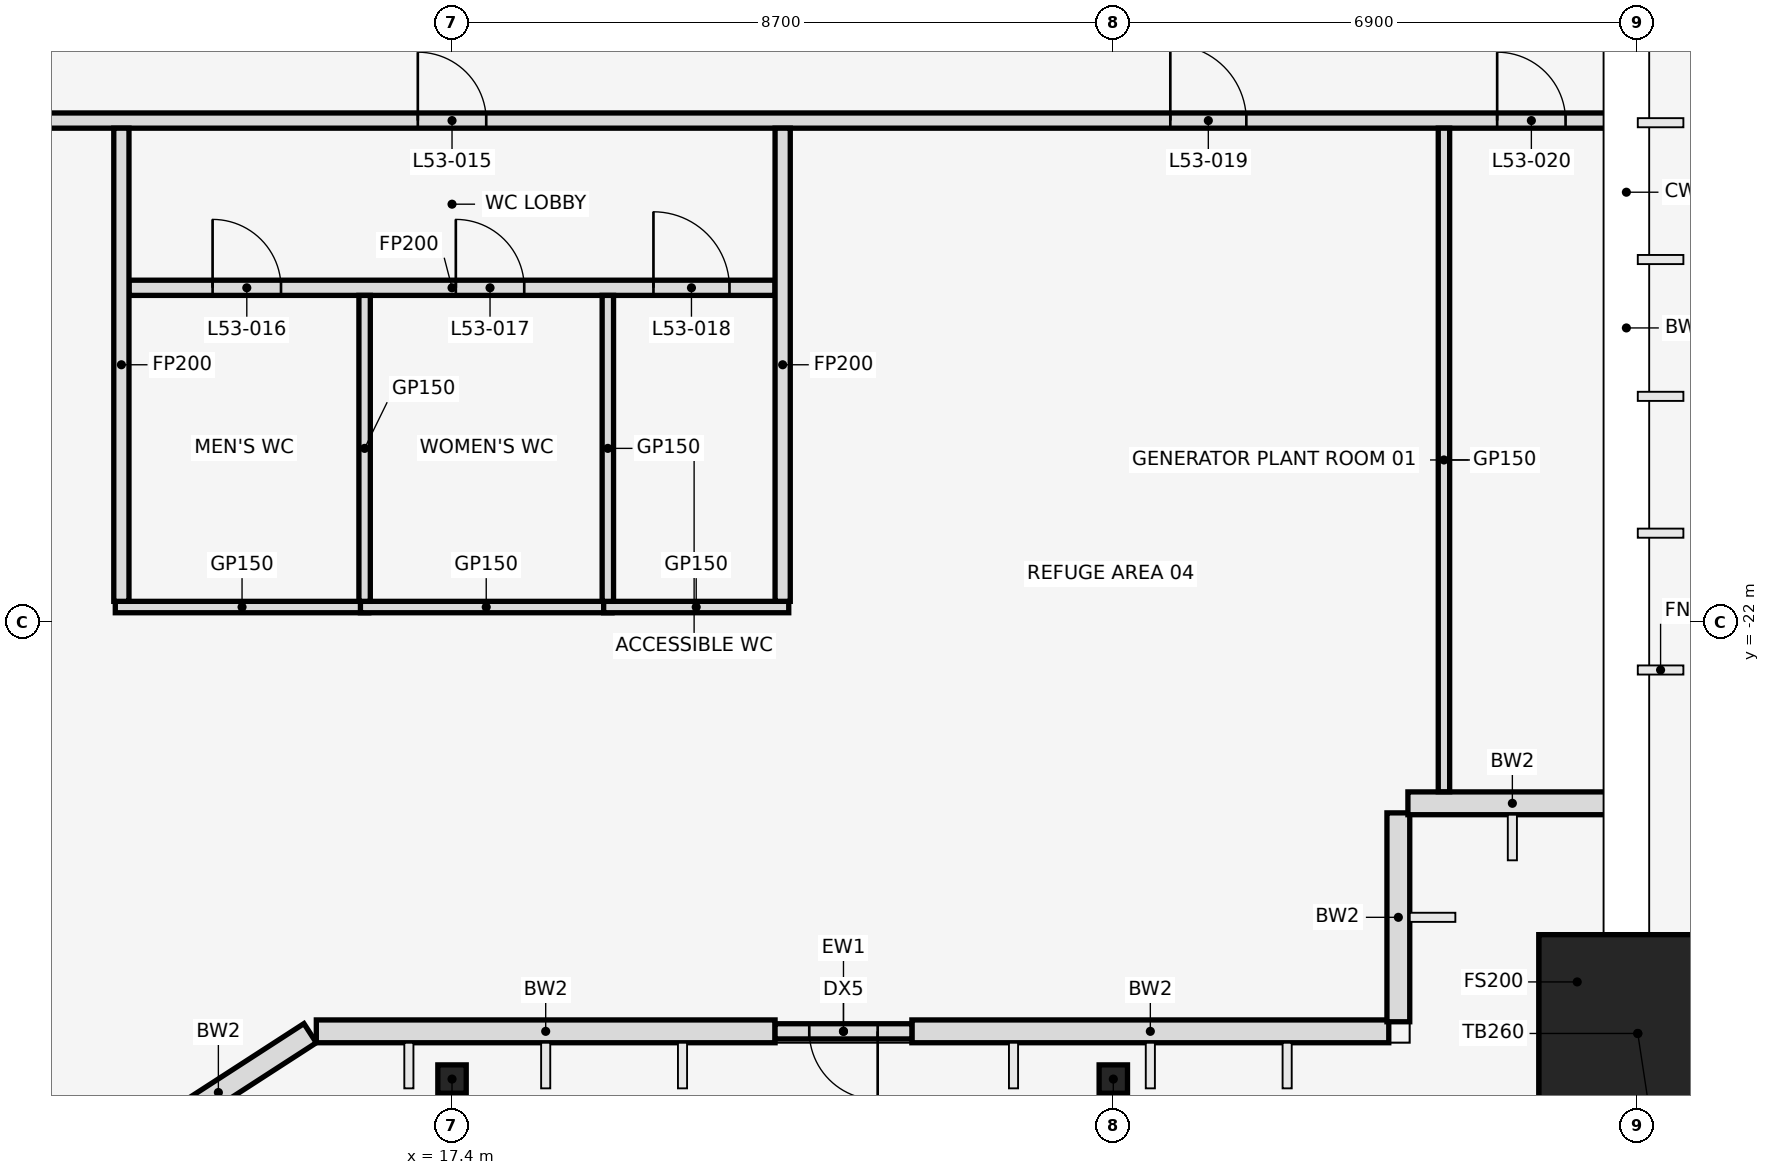
"""IFC4 building model, lengths in metres.
Left out: names, types, materials, properties, quantities, classifications, styles, units other than length and angle.
Written with IfcOpenShell. Run it as: python <this file> out.ifc"""

import sys

from ifc_helpers import new_model, si_unit, direction, frame, frame_2d, origin, origin_2d, place, context, subcontext, project, spatial, rectangle, hollow_rectangle, i_section, extrude, element, fill, save


model = new_model("IFC4")
c1 = context("Model", 3, precision=1e-05, world=origin(), true_north=direction((0.0, 1.0)))
c2 = subcontext(c1, "Body", "Model", "MODEL_VIEW")
j1 = project(units=[si_unit("LENGTHUNIT", "METRE"), si_unit("PLANEANGLEUNIT", "RADIAN")], contexts=[c1])
p1 = place(None, origin())
s1 = spatial("IfcSite", under=j1, at=p1, CompositionType="ELEMENT")
p2 = place(p1, origin())
s2 = spatial("IfcBuilding", under=s1, at=p2, CompositionType="ELEMENT")
p3 = place(p2, frame((0.0, 0.0, 236.0)))
s3 = spatial("IfcBuildingStorey", under=s2, at=p3, CompositionType="ELEMENT", Elevation=236.0)
for number, where, z_axis, x_axis in (
    (1, (17.4, -28.01, 0.0), (0.0, 0.0, 1.0), (1.0, 0.0, 0.0)),
    (2, (26.1, -28.01, 0.0), (0.0, 0.0, 1.0), (1.0, 0.0, 0.0)),
):
    element("IfcColumn", number, at=place(p3, frame(where, z_axis=z_axis, x_axis=x_axis)), inside=s3, PredefinedType="COLUMN", context=c2, shape_type="SweptSolid", body=[
        extrude(i_section(OverallWidth=0.373, OverallDepth=0.373, WebThickness=0.016, FlangeThickness=0.026, at=origin_2d()), origin(), (0.0, 0.0, 1.0), 5.4),
    ])
p4 = place(p3, frame((33.0, -27.41, 0.0), z_axis=(0.0, 0.0, 1.0), x_axis=(1.0, 0.0, 0.0)))
e3 = element("IfcColumn", 3, at=p4, inside=s3, PredefinedType="COLUMN", context=c2, shape_type="SweptSolid", body=[
    extrude(hollow_rectangle(XDim=2.6, YDim=2.6, WallThickness=0.07, at=origin_2d()), origin(), (0.0, 0.0, 1.0), 4.98),
])
p5 = place(p3, frame((33.0, -27.41, 4.98), z_axis=(0.0, 0.0, 1.0), x_axis=(1.0, 0.0, 0.0)))
e4 = element("IfcColumn", 4, at=p5, inside=s3, PredefinedType="COLUMN", context=c2, shape_type="SweptSolid", body=[
    extrude(rectangle(XDim=2.6, YDim=2.6, at=origin_2d()), origin(), (0.0, 0.0, 1.0), 0.42),
])
p6 = place(p3, frame((32.85, -24.256, 0.0), z_axis=(0.0, 0.0, 1.0), x_axis=(0.0, 1.0, 0.0)))
e5 = element("IfcWall", 5, at=p6, inside=s3, PredefinedType="STANDARD", context=c2, shape_type="SweptSolid", body=[
    extrude(rectangle(XDim=12.256, YDim=0.3, at=frame_2d((6.128, 0.0))), origin(), (0.0, 0.0, 1.0), 4.338),
])
p7 = place(p3, frame((13.119, -28.967, 0.0), z_axis=(0.0, 0.0, 1.0), x_axis=(0.839779682339, 0.542927329512, 0.0)))
e6 = element("IfcWall", 6, at=p7, inside=s3, PredefinedType="STANDARD", context=c2, shape_type="SweptSolid", body=[
    extrude(rectangle(XDim=2.875, YDim=0.3, at=frame_2d((1.438, 0.0))), origin(), (0.0, 0.0, 1.0), 4.496),
])
p8 = place(p3, frame((15.615, -27.382, 0.0), z_axis=(0.0, 0.0, 1.0), x_axis=(1.0, 0.0, 0.0)))
e7 = element("IfcWall", 7, at=p8, inside=s3, PredefinedType="STANDARD", context=c2, shape_type="SweptSolid", body=[
    extrude(rectangle(XDim=6.035, YDim=0.3, at=frame_2d((3.018, 0.0))), origin(), (0.0, 0.0, 1.0), 4.572),
])
p9 = place(p3, frame((23.45, -27.382, 0.0), z_axis=(0.0, 0.0, 1.0), x_axis=(1.0, 0.0, 0.0)))
e8 = element("IfcWall", 8, at=p9, inside=s3, PredefinedType="STANDARD", context=c2, shape_type="SweptSolid", body=[
    extrude(rectangle(XDim=6.274, YDim=0.3, at=frame_2d((3.137, 0.0))), origin(), (0.0, 0.0, 1.0), 4.572),
])
for number, where, z_axis, x_axis in (
    (9, (29.85, -27.256, 0.0), (0.0, 0.0, 1.0), (0.0, 1.0, 0.0)),
    (10, (29.976, -24.382, 0.0), (0.0, 0.0, 1.0), (1.0, 0.0, 0.0)),
):
    element("IfcWall", number, at=place(p3, frame(where, z_axis=z_axis, x_axis=x_axis)), inside=s3, PredefinedType="STANDARD", context=c2, shape_type="SweptSolid", body=[
        extrude(rectangle(XDim=2.748, YDim=0.3, at=frame_2d((1.374, 0.0))), origin(), (0.0, 0.0, 1.0), 4.572),
    ])
p10 = place(p3, frame((23.45, -27.382, 0.0), z_axis=(0.0, 0.0, 1.0), x_axis=(-1.0, 0.0, 0.0)))
e11 = element("IfcWall", 11, at=p10, inside=s3, PredefinedType="STANDARD", context=c2, shape_type="SweptSolid", body=[
    extrude(rectangle(XDim=1.8, YDim=0.2, at=frame_2d((0.9, 0.0))), origin(), (0.0, 0.0, 1.0), 5.25),
])
p11 = place(p10, frame((0.45, 0.0, 0.0)))
e12 = element("IfcOpeningElement", 12, at=p11, cuts=e11, PredefinedType="OPENING", context=c2, shape_type="SweptSolid", body=[
    extrude(rectangle(XDim=0.9, YDim=2.1, at=frame_2d((0.45, 1.05))), frame((0.0, 0.112, 0.0), z_axis=(0.0, -1.0, 0.0), x_axis=(1.0, 0.0, 0.0)), (0.0, 0.0, 1.0), 0.224),
])
p12 = place(p3, frame((12.97, -21.8, 0.0), z_axis=(0.0, 0.0, 1.0), x_axis=(1.0, 0.0, 0.0)))
e13 = element("IfcWall", 13, at=p12, inside=s3, PredefinedType="PARTITIONING", context=c2, shape_type="SweptSolid", body=[
    extrude(rectangle(XDim=3.335, YDim=0.15, at=frame_2d((1.667, 0.0))), origin(), (0.0, 0.0, 1.0), 4.318),
])
p13 = place(p3, frame((16.195, -21.8, 0.0), z_axis=(0.0, 0.0, 1.0), x_axis=(1.0, 0.0, 0.0)))
e14 = element("IfcWall", 14, at=p13, inside=s3, PredefinedType="PARTITIONING", context=c2, shape_type="SweptSolid", body=[
    extrude(rectangle(XDim=3.31, YDim=0.15, at=frame_2d((1.655, 0.0))), origin(), (0.0, 0.0, 1.0), 4.318),
])
p14 = place(p3, frame((19.395, -21.8, 0.0), z_axis=(0.0, 0.0, 1.0), x_axis=(1.0, 0.0, 0.0)))
e15 = element("IfcWall", 15, at=p14, inside=s3, PredefinedType="PARTITIONING", context=c2, shape_type="SweptSolid", body=[
    extrude(rectangle(XDim=2.435, YDim=0.15, at=frame_2d((1.218, 0.0))), origin(), (0.0, 0.0, 1.0), 4.318),
])
p15 = place(p3, frame((13.15, -17.6, 0.0), z_axis=(0.0, 0.0, 1.0), x_axis=(1.0, 0.0, 0.0)))
e16 = element("IfcWall", 16, at=p15, inside=s3, PredefinedType="PARTITIONING", context=c2, shape_type="SweptSolid", body=[
    extrude(rectangle(XDim=8.5, YDim=0.2, at=frame_2d((4.25, 0.0))), origin(), (0.0, 0.0, 1.0), 4.318),
])
p16 = place(p15, frame((1.1, 0.0, 0.0)))
e17 = element("IfcOpeningElement", 17, at=p16, cuts=e16, PredefinedType="OPENING", context=c2, shape_type="SweptSolid", body=[
    extrude(rectangle(XDim=0.9, YDim=2.1, at=frame_2d((0.45, 1.05))), frame((0.0, 0.112, 0.0), z_axis=(0.0, -1.0, 0.0), x_axis=(1.0, 0.0, 0.0)), (0.0, 0.0, 1.0), 0.224),
])
p17 = place(p15, frame((4.3, 0.0, 0.0)))
e18 = element("IfcOpeningElement", 18, at=p17, cuts=e16, PredefinedType="OPENING", context=c2, shape_type="SweptSolid", body=[
    extrude(rectangle(XDim=0.9, YDim=2.1, at=frame_2d((0.45, 1.05))), frame((0.0, 0.112, 0.0), z_axis=(0.0, -1.0, 0.0), x_axis=(1.0, 0.0, 0.0)), (0.0, 0.0, 1.0), 0.224),
])
p18 = place(p15, frame((6.9, 0.0, 0.0)))
e19 = element("IfcOpeningElement", 19, at=p18, cuts=e16, PredefinedType="OPENING", context=c2, shape_type="SweptSolid", body=[
    extrude(rectangle(XDim=1.0, YDim=2.1, at=frame_2d((0.5, 1.05))), frame((0.0, 0.112, 0.0), z_axis=(0.0, -1.0, 0.0), x_axis=(1.0, 0.0, 0.0)), (0.0, 0.0, 1.0), 0.224),
])
p19 = place(p3, frame((-32.7, -15.4, 0.0), z_axis=(0.0, 0.0, 1.0), x_axis=(1.0, 0.0, 0.0)))
e20 = element("IfcWall", 20, at=p19, inside=s3, PredefinedType="PARTITIONING", context=c2, shape_type="SweptSolid", body=[
    extrude(rectangle(XDim=65.4, YDim=0.2, at=frame_2d((32.7, 0.0))), origin(), (0.0, 0.0, 1.0), 4.318),
])
p20 = place(p19, frame((0.7, 0.0, 0.0)))
e21 = element("IfcOpeningElement", 21, at=p20, cuts=e20, PredefinedType="OPENING", context=c2, shape_type="SweptSolid", body=[
    extrude(rectangle(XDim=0.9, YDim=2.1, at=frame_2d((0.45, 1.05))), frame((0.0, 0.112, 0.0), z_axis=(0.0, -1.0, 0.0), x_axis=(1.0, 0.0, 0.0)), (0.0, 0.0, 1.0), 0.224),
])
p21 = place(p19, frame((4.85, 0.0, 0.0)))
e22 = element("IfcOpeningElement", 22, at=p21, cuts=e20, PredefinedType="OPENING", context=c2, shape_type="SweptSolid", body=[
    extrude(rectangle(XDim=1.0, YDim=2.1, at=frame_2d((0.5, 1.05))), frame((0.0, 0.112, 0.0), z_axis=(0.0, -1.0, 0.0), x_axis=(1.0, 0.0, 0.0)), (0.0, 0.0, 1.0), 0.224),
])
p22 = place(p19, frame((14.85, 0.0, 0.0)))
e23 = element("IfcOpeningElement", 23, at=p22, cuts=e20, PredefinedType="OPENING", context=c2, shape_type="SweptSolid", body=[
    extrude(rectangle(XDim=1.0, YDim=2.1, at=frame_2d((0.5, 1.05))), frame((0.0, 0.112, 0.0), z_axis=(0.0, -1.0, 0.0), x_axis=(1.0, 0.0, 0.0)), (0.0, 0.0, 1.0), 0.224),
])
p23 = place(p19, frame((23.55, 0.0, 0.0)))
e24 = element("IfcOpeningElement", 24, at=p23, cuts=e20, PredefinedType="OPENING", context=c2, shape_type="SweptSolid", body=[
    extrude(rectangle(XDim=1.0, YDim=2.1, at=frame_2d((0.5, 1.05))), frame((0.0, 0.112, 0.0), z_axis=(0.0, -1.0, 0.0), x_axis=(1.0, 0.0, 0.0)), (0.0, 0.0, 1.0), 0.224),
])
p24 = place(p19, frame((34.4, 0.0, 0.0)))
e25 = element("IfcOpeningElement", 25, at=p24, cuts=e20, PredefinedType="OPENING", context=c2, shape_type="SweptSolid", body=[
    extrude(rectangle(XDim=1.0, YDim=2.1, at=frame_2d((0.5, 1.05))), frame((0.0, 0.112, 0.0), z_axis=(0.0, -1.0, 0.0), x_axis=(1.0, 0.0, 0.0)), (0.0, 0.0, 1.0), 0.224),
])
p25 = place(p19, frame((40.95, 0.0, 0.0)))
e26 = element("IfcOpeningElement", 26, at=p25, cuts=e20, PredefinedType="OPENING", context=c2, shape_type="SweptSolid", body=[
    extrude(rectangle(XDim=1.0, YDim=2.1, at=frame_2d((0.5, 1.05))), frame((0.0, 0.112, 0.0), z_axis=(0.0, -1.0, 0.0), x_axis=(1.0, 0.0, 0.0)), (0.0, 0.0, 1.0), 0.224),
])
p26 = place(p19, frame((49.65, 0.0, 0.0)))
e27 = element("IfcOpeningElement", 27, at=p26, cuts=e20, PredefinedType="OPENING", context=c2, shape_type="SweptSolid", body=[
    extrude(rectangle(XDim=0.9, YDim=2.1, at=frame_2d((0.45, 1.05))), frame((0.0, 0.112, 0.0), z_axis=(0.0, -1.0, 0.0), x_axis=(1.0, 0.0, 0.0)), (0.0, 0.0, 1.0), 0.224),
])
p27 = place(p19, frame((59.55, 0.0, 0.0)))
e28 = element("IfcOpeningElement", 28, at=p27, cuts=e20, PredefinedType="OPENING", context=c2, shape_type="SweptSolid", body=[
    extrude(rectangle(XDim=1.0, YDim=2.1, at=frame_2d((0.5, 1.05))), frame((0.0, 0.112, 0.0), z_axis=(0.0, -1.0, 0.0), x_axis=(1.0, 0.0, 0.0)), (0.0, 0.0, 1.0), 0.224),
])
p28 = place(p19, frame((63.85, 0.0, 0.0)))
e29 = element("IfcOpeningElement", 29, at=p28, cuts=e20, PredefinedType="OPENING", context=c2, shape_type="SweptSolid", body=[
    extrude(rectangle(XDim=0.9, YDim=2.1, at=frame_2d((0.45, 1.05))), frame((0.0, 0.112, 0.0), z_axis=(0.0, -1.0, 0.0), x_axis=(1.0, 0.0, 0.0)), (0.0, 0.0, 1.0), 0.224),
])
p29 = place(p3, frame((13.05, -21.725, 0.0), z_axis=(0.0, 0.0, 1.0), x_axis=(0.0, 1.0, 0.0)))
e30 = element("IfcWall", 30, at=p29, inside=s3, PredefinedType="PARTITIONING", context=c2, shape_type="SweptSolid", body=[
    extrude(rectangle(XDim=6.225, YDim=0.2, at=frame_2d((3.113, 0.0))), origin(), (0.0, 0.0, 1.0), 4.318),
])
for number, where, z_axis, x_axis in (
    (31, (16.25, -21.725, 0.0), (0.0, 0.0, 1.0), (0.0, 1.0, 0.0)),
    (32, (19.45, -21.725, 0.0), (0.0, 0.0, 1.0), (0.0, 1.0, 0.0)),
):
    element("IfcWall", number, at=place(p3, frame(where, z_axis=z_axis, x_axis=x_axis)), inside=s3, PredefinedType="PARTITIONING", context=c2, shape_type="SweptSolid", body=[
        extrude(rectangle(XDim=4.025, YDim=0.15, at=frame_2d((2.013, 0.0))), origin(), (0.0, 0.0, 1.0), 4.318),
    ])
p30 = place(p3, frame((21.75, -21.725, 0.0), z_axis=(0.0, 0.0, 1.0), x_axis=(0.0, 1.0, 0.0)))
e33 = element("IfcWall", 33, at=p30, inside=s3, PredefinedType="PARTITIONING", context=c2, shape_type="SweptSolid", body=[
    extrude(rectangle(XDim=6.225, YDim=0.2, at=frame_2d((3.113, 0.0))), origin(), (0.0, 0.0, 1.0), 4.318),
])
p31 = place(p3, frame((30.45, -24.23, 0.0), z_axis=(0.0, 0.0, 1.0), x_axis=(0.0, 1.0, 0.0)))
e34 = element("IfcWall", 34, at=p31, inside=s3, PredefinedType="PARTITIONING", context=c2, shape_type="SweptSolid", body=[
    extrude(rectangle(XDim=8.73, YDim=0.15, at=frame_2d((4.365, 0.0))), origin(), (0.0, 0.0, 1.0), 4.318),
])
p32 = place(p11, origin())
e35 = element("IfcDoor", 35, at=p32, inside=s3, OperationType="SINGLE_SWING_LEFT", PredefinedType="DOOR", context=c2, shape_type="SweptSolid", body=[
    extrude(rectangle(XDim=0.9, YDim=2.1, at=frame_2d((0.45, 1.05))), frame((0.0, 0.025, 0.0), z_axis=(0.0, -1.0, 0.0), x_axis=(1.0, 0.0, 0.0)), (0.0, 0.0, 1.0), 0.05),
])
fill(e12, e35)
p33 = place(p26, frame((0.9, 0.0, 0.0), z_axis=(0.0, 0.0, 1.0), x_axis=(-1.0, 0.0, 0.0)))
e36 = element("IfcDoor", 36, at=p33, inside=s3, OperationType="SINGLE_SWING_RIGHT", PredefinedType="DOOR", context=c2, shape_type="SweptSolid", body=[
    extrude(rectangle(XDim=0.9, YDim=2.1, at=frame_2d((0.45, 1.05))), frame((0.0, 0.025, 0.0), z_axis=(0.0, -1.0, 0.0), x_axis=(1.0, 0.0, 0.0)), (0.0, 0.0, 1.0), 0.05),
])
fill(e27, e36)
p34 = place(p16, frame((0.9, 0.0, 0.0), z_axis=(0.0, 0.0, 1.0), x_axis=(-1.0, 0.0, 0.0)))
e37 = element("IfcDoor", 37, at=p34, inside=s3, OperationType="SINGLE_SWING_LEFT", PredefinedType="DOOR", context=c2, shape_type="SweptSolid", body=[
    extrude(rectangle(XDim=0.9, YDim=2.1, at=frame_2d((0.45, 1.05))), frame((0.0, 0.025, 0.0), z_axis=(0.0, -1.0, 0.0), x_axis=(1.0, 0.0, 0.0)), (0.0, 0.0, 1.0), 0.05),
])
fill(e17, e37)
p35 = place(p17, frame((0.9, 0.0, 0.0), z_axis=(0.0, 0.0, 1.0), x_axis=(-1.0, 0.0, 0.0)))
e38 = element("IfcDoor", 38, at=p35, inside=s3, OperationType="SINGLE_SWING_RIGHT", PredefinedType="DOOR", context=c2, shape_type="SweptSolid", body=[
    extrude(rectangle(XDim=0.9, YDim=2.1, at=frame_2d((0.45, 1.05))), frame((0.0, 0.025, 0.0), z_axis=(0.0, -1.0, 0.0), x_axis=(1.0, 0.0, 0.0)), (0.0, 0.0, 1.0), 0.05),
])
fill(e18, e38)
p36 = place(p18, frame((1.0, 0.0, 0.0), z_axis=(0.0, 0.0, 1.0), x_axis=(-1.0, 0.0, 0.0)))
e39 = element("IfcDoor", 39, at=p36, inside=s3, OperationType="SINGLE_SWING_RIGHT", PredefinedType="DOOR", context=c2, shape_type="SweptSolid", body=[
    extrude(rectangle(XDim=1.0, YDim=2.1, at=frame_2d((0.5, 1.05))), frame((0.0, 0.025, 0.0), z_axis=(0.0, -1.0, 0.0), x_axis=(1.0, 0.0, 0.0)), (0.0, 0.0, 1.0), 0.05),
])
fill(e19, e39)
p37 = place(p27, frame((1.0, 0.0, 0.0), z_axis=(0.0, 0.0, 1.0), x_axis=(-1.0, 0.0, 0.0)))
e40 = element("IfcDoor", 40, at=p37, inside=s3, OperationType="SINGLE_SWING_LEFT", PredefinedType="DOOR", context=c2, shape_type="SweptSolid", body=[
    extrude(rectangle(XDim=1.0, YDim=2.1, at=frame_2d((0.5, 1.05))), frame((0.0, 0.025, 0.0), z_axis=(0.0, -1.0, 0.0), x_axis=(1.0, 0.0, 0.0)), (0.0, 0.0, 1.0), 0.05),
])
fill(e28, e40)
p38 = place(p28, frame((0.9, 0.0, 0.0), z_axis=(0.0, 0.0, 1.0), x_axis=(-1.0, 0.0, 0.0)))
e41 = element("IfcDoor", 41, at=p38, inside=s3, OperationType="SINGLE_SWING_RIGHT", PredefinedType="DOOR", context=c2, shape_type="SweptSolid", body=[
    extrude(rectangle(XDim=0.9, YDim=2.1, at=frame_2d((0.45, 1.05))), frame((0.0, 0.025, 0.0), z_axis=(0.0, -1.0, 0.0), x_axis=(1.0, 0.0, 0.0)), (0.0, 0.0, 1.0), 0.05),
])
fill(e29, e41)
save(model, sys.argv[1])
